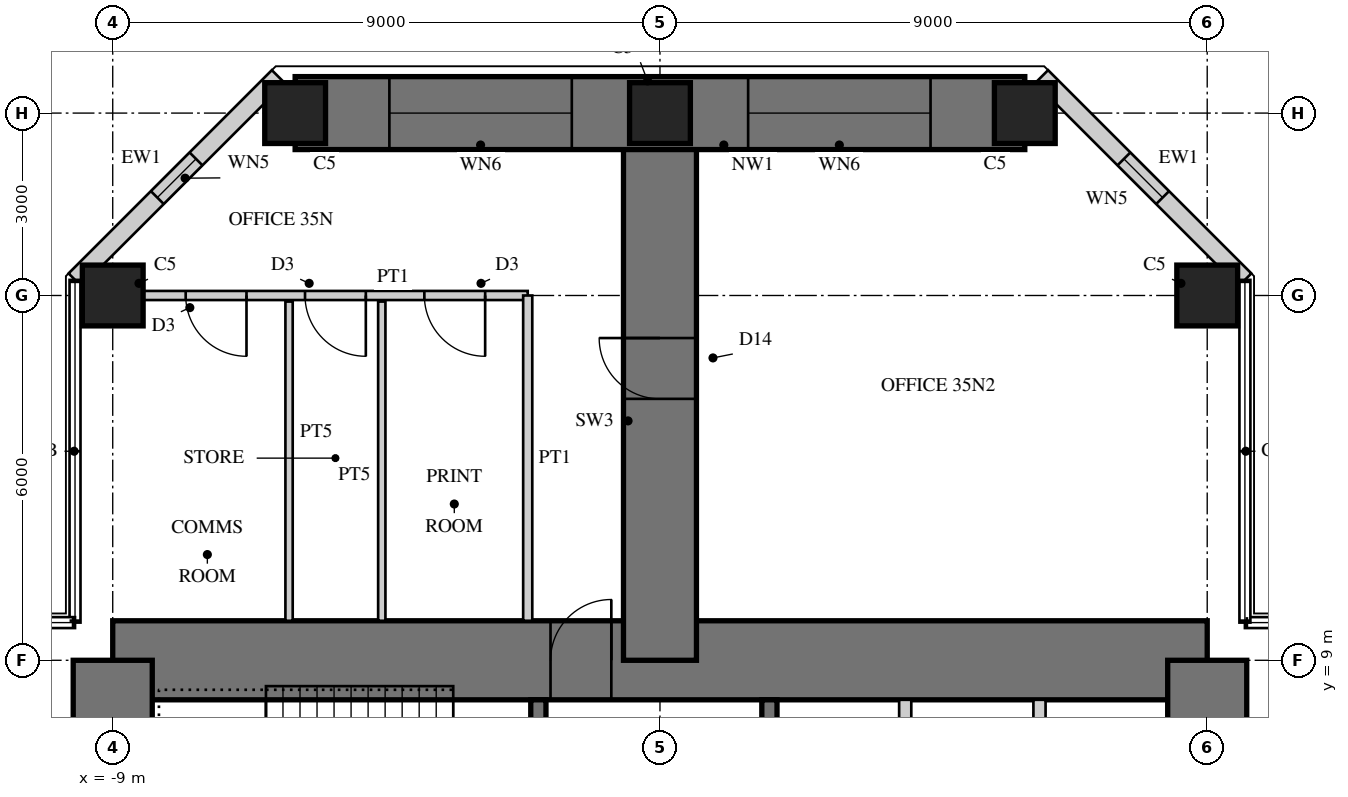
"""IFC4 building model, lengths in metres.
Left out: names, types, materials, properties, quantities, classifications, styles, units other than length and angle.
Written with IfcOpenShell. Run it as: python <this file> out.ifc"""

import sys

from ifc_helpers import new_model, si_unit, direction, frame, frame_2d, origin, origin_2d, place, context, subcontext, project, spatial, rectangle, hollow_rectangle, extrude, element, fill, save


model = new_model("IFC4")
c1 = context("Model", 3, precision=1e-05, world=origin(), true_north=direction((0.0, 1.0)))
c2 = subcontext(c1, "Body", "Model", "MODEL_VIEW")
j1 = project(units=[si_unit("LENGTHUNIT", "METRE"), si_unit("PLANEANGLEUNIT", "RADIAN")], contexts=[c1])
p1 = place(None, origin())
s1 = spatial("IfcSite", under=j1, at=p1, CompositionType="ELEMENT")
p2 = place(p1, origin())
s2 = spatial("IfcBuilding", under=s1, at=p2, CompositionType="ELEMENT")
p3 = place(p2, frame((0.0, 0.0, 144.5)))
s3 = spatial("IfcBuildingStorey", under=s2, at=p3, CompositionType="ELEMENT", Elevation=144.5)
p4 = place(p3, frame((9.0, 9.0, 0.0), z_axis=(0.0, 0.0, 1.0), x_axis=(-1.0, 0.0, 0.0)))
e1 = element("IfcWall", 1, at=p4, inside=s3, PredefinedType="SHEAR", context=c2, shape_type="SweptSolid", body=[
    extrude(rectangle(XDim=18.0, YDim=1.3, at=frame_2d((9.0, 0.0))), origin(), (0.0, 0.0, 1.0), 4.0),
])
p5 = place(p4, frame((9.8, 0.0, 0.0)))
e2 = element("IfcOpeningElement", 2, at=p5, cuts=e1, PredefinedType="OPENING", context=c2, shape_type="SweptSolid", body=[
    extrude(rectangle(XDim=1.0, YDim=2.4, at=frame_2d((0.5, 1.2))), frame((0.0, 0.66, 0.0), z_axis=(0.0, -1.0, 0.0), x_axis=(1.0, 0.0, 0.0)), (0.0, 0.0, 1.0), 1.32),
])
p6 = place(p3, frame((9.0, -9.0, 0.0), z_axis=(0.0, 0.0, 1.0), x_axis=(0.0, 1.0, 0.0)))
e3 = element("IfcWall", 3, at=p6, inside=s3, PredefinedType="SHEAR", context=c2, shape_type="SweptSolid", body=[
    extrude(rectangle(XDim=18.0, YDim=1.3, at=frame_2d((9.0, 0.0))), origin(), (0.0, 0.0, 1.0), 4.0),
])
p7 = place(p6, frame((9.8, 0.0, 0.0)))
e4 = element("IfcOpeningElement", 4, at=p7, cuts=e3, PredefinedType="OPENING", context=c2, shape_type="SweptSolid", body=[
    extrude(rectangle(XDim=1.0, YDim=2.4, at=frame_2d((0.5, 1.2))), frame((0.0, 0.66, 0.0), z_axis=(0.0, -1.0, 0.0), x_axis=(1.0, 0.0, 0.0)), (0.0, 0.0, 1.0), 1.32),
])
p8 = place(p3, frame((-9.0, 9.0, 0.0), z_axis=(0.0, 0.0, 1.0), x_axis=(0.0, -1.0, 0.0)))
e5 = element("IfcWall", 5, at=p8, inside=s3, PredefinedType="SHEAR", context=c2, shape_type="SweptSolid", body=[
    extrude(rectangle(XDim=18.0, YDim=1.3, at=frame_2d((9.0, 0.0))), origin(), (0.0, 0.0, 1.0), 4.0),
])
p9 = place(p8, frame((9.8, 0.0, 0.0)))
e6 = element("IfcOpeningElement", 6, at=p9, cuts=e5, PredefinedType="OPENING", context=c2, shape_type="SweptSolid", body=[
    extrude(rectangle(XDim=1.0, YDim=2.4, at=frame_2d((0.5, 1.2))), frame((0.0, 0.66, 0.0), z_axis=(0.0, -1.0, 0.0), x_axis=(1.0, 0.0, 0.0)), (0.0, 0.0, 1.0), 1.32),
])
p10 = place(p3, frame((1.8, 1.875, 0.0), z_axis=(0.0, 0.0, 1.0), x_axis=(0.0, 1.0, 0.0)))
e7 = element("IfcWall", 7, at=p10, inside=s3, PredefinedType="SHEAR", context=c2, shape_type="SweptSolid", body=[
    extrude(rectangle(XDim=6.475, YDim=0.25, at=frame_2d((3.238, 0.0))), origin(), (0.0, 0.0, 1.0), 4.0),
])
p11 = place(p10, frame((1.875, 0.0, 0.0)))
e8 = element("IfcOpeningElement", 8, at=p11, cuts=e7, PredefinedType="OPENING", context=c2, shape_type="SweptSolid", body=[
    extrude(rectangle(XDim=1.6, YDim=2.4, at=frame_2d((0.8, 1.2))), frame((0.0, 0.135, 0.0), z_axis=(0.0, -1.0, 0.0), x_axis=(1.0, 0.0, 0.0)), (0.0, 0.0, 1.0), 0.27),
])
for number, where, z_axis, x_axis in (
    (9, (4.033, 5.975, 0.0), (0.0, 0.0, 1.0), (0.0, 1.0, 0.0)),
    (10, (6.242, 5.975, 0.0), (0.0, 0.0, 1.0), (0.0, 1.0, 0.0)),
):
    element("IfcWall", number, at=place(p3, frame(where, z_axis=z_axis, x_axis=x_axis)), inside=s3, PredefinedType="PARTITIONING", context=c2, shape_type="SweptSolid", body=[
        extrude(rectangle(XDim=2.375, YDim=0.2, at=frame_2d((1.188, 0.0))), origin(), (0.0, 0.0, 1.0), 4.0),
    ])
p12 = place(p3, frame((-2.0, 1.675, 0.0), z_axis=(0.0, 0.0, 1.0), x_axis=(0.0, 1.0, 0.0)))
e11 = element("IfcWall", 11, at=p12, inside=s3, PredefinedType="SHEAR", context=c2, shape_type="SweptSolid", body=[
    extrude(rectangle(XDim=6.675, YDim=0.25, at=frame_2d((3.337, 0.0))), origin(), (0.0, 0.0, 1.0), 4.0),
])
p13 = place(p12, frame((0.725, 0.0, 0.0)))
e12 = element("IfcOpeningElement", 12, at=p13, cuts=e11, PredefinedType="OPENING", context=c2, shape_type="SweptSolid", body=[
    extrude(rectangle(XDim=1.0, YDim=2.1, at=frame_2d((0.5, 1.05))), frame((0.0, 0.135, 0.0), z_axis=(0.0, -1.0, 0.0), x_axis=(1.0, 0.0, 0.0)), (0.0, 0.0, 1.0), 0.27),
])
p14 = place(p3, frame((0.0, 9.0, 0.0), z_axis=(0.0, 0.0, 1.0), x_axis=(0.0, 1.0, 0.0)))
e13 = element("IfcWall", 13, at=p14, inside=s3, PredefinedType="SHEAR", context=c2, shape_type="SweptSolid", body=[
    extrude(rectangle(XDim=9.0, YDim=1.2, at=frame_2d((4.5, 0.0))), origin(), (0.0, 0.0, 1.0), 4.0),
])
p15 = place(p14, frame((4.3, 0.0, 0.0)))
e14 = element("IfcOpeningElement", 14, at=p15, cuts=e13, PredefinedType="OPENING", context=c2, shape_type="SweptSolid", body=[
    extrude(rectangle(XDim=1.0, YDim=2.2, at=frame_2d((0.5, 1.1))), frame((0.0, 0.61, 0.0), z_axis=(0.0, -1.0, 0.0), x_axis=(1.0, 0.0, 0.0)), (0.0, 0.0, 1.0), 1.22),
])
p16 = place(p3, frame((6.0, 18.0, 0.0), z_axis=(0.0, 0.0, 1.0), x_axis=(-1.0, 0.0, 0.0)))
e15 = element("IfcWall", 15, at=p16, inside=s3, PredefinedType="SHEAR", context=c2, shape_type="SweptSolid", body=[
    extrude(rectangle(XDim=12.0, YDim=1.2, at=frame_2d((6.0, 0.0))), origin(), (0.0, 0.0, 1.0), 4.0),
])
p17 = place(p16, frame((1.55, 0.0, 0.6)))
e16 = element("IfcOpeningElement", 16, at=p17, cuts=e15, PredefinedType="OPENING", context=c2, shape_type="SweptSolid", body=[
    extrude(rectangle(XDim=3.0, YDim=2.4, at=frame_2d((1.5, 1.2))), frame((0.0, 0.61, 0.0), z_axis=(0.0, -1.0, 0.0), x_axis=(1.0, 0.0, 0.0)), (0.0, 0.0, 1.0), 1.22),
])
p18 = place(p16, frame((7.45, 0.0, 0.6)))
e17 = element("IfcOpeningElement", 17, at=p18, cuts=e15, PredefinedType="OPENING", context=c2, shape_type="SweptSolid", body=[
    extrude(rectangle(XDim=3.0, YDim=2.4, at=frame_2d((1.5, 1.2))), frame((0.0, 0.61, 0.0), z_axis=(0.0, -1.0, 0.0), x_axis=(1.0, 0.0, 0.0)), (0.0, 0.0, 1.0), 1.22),
])
for number, where, z_axis, x_axis in (
    (18, (9.0, 15.0, 0.0), (0.0, 0.0, 1.0), (1.0, 0.0, 0.0)),
    (19, (-9.0, 15.0, 0.0), (0.0, 0.0, 1.0), (1.0, 0.0, 0.0)),
    (20, (6.0, 18.0, 0.0), (0.0, 0.0, 1.0), (1.0, 0.0, 0.0)),
    (21, (0.0, 18.0, 0.0), (0.0, 0.0, 1.0), (1.0, 0.0, 0.0)),
    (22, (-6.0, 18.0, 0.0), (0.0, 0.0, 1.0), (1.0, 0.0, 0.0)),
):
    element("IfcColumn", number, at=place(p3, frame(where, z_axis=z_axis, x_axis=x_axis)), inside=s3, PredefinedType="COLUMN", context=c2, shape_type="SweptSolid", body=[
        extrude(rectangle(XDim=1.0, YDim=1.0, at=origin_2d()), origin(), (0.0, 0.0, 1.0), 4.0),
    ])
p19 = place(p3, frame((9.62, 15.257, 0.0), z_axis=(0.0, 0.0, 1.0), x_axis=(-0.707106781187, 0.707106781187, 0.0)))
e23 = element("IfcWall", 23, at=p19, inside=s3, PredefinedType="SOLIDWALL", context=c2, shape_type="SweptSolid", body=[
    extrude(rectangle(XDim=4.728, YDim=0.3, at=frame_2d((2.364, 0.0))), origin(), (0.0, 0.0, 1.0), 3.8),
])
p20 = place(p19, frame((1.914, 0.0, 0.3)))
e24 = element("IfcOpeningElement", 24, at=p20, cuts=e23, PredefinedType="OPENING", context=c2, shape_type="SweptSolid", body=[
    extrude(rectangle(XDim=0.9, YDim=2.4, at=frame_2d((0.45, 1.2))), frame((0.0, 0.16, 0.0), z_axis=(0.0, -1.0, 0.0), x_axis=(1.0, 0.0, 0.0)), (0.0, 0.0, 1.0), 0.32),
])
p21 = place(p3, frame((-6.277, 18.6, 0.0), z_axis=(0.0, 0.0, 1.0), x_axis=(-0.707106781187, -0.707106781187, 0.0)))
e25 = element("IfcWall", 25, at=p21, inside=s3, PredefinedType="SOLIDWALL", context=c2, shape_type="SweptSolid", body=[
    extrude(rectangle(XDim=4.728, YDim=0.3, at=frame_2d((2.364, 0.0))), origin(), (0.0, 0.0, 1.0), 3.8),
])
p22 = place(p21, frame((1.914, 0.0, 0.3)))
e26 = element("IfcOpeningElement", 26, at=p22, cuts=e25, PredefinedType="OPENING", context=c2, shape_type="SweptSolid", body=[
    extrude(rectangle(XDim=0.9, YDim=2.4, at=frame_2d((0.45, 1.2))), frame((0.0, 0.16, 0.0), z_axis=(0.0, -1.0, 0.0), x_axis=(1.0, 0.0, 0.0)), (0.0, 0.0, 1.0), 0.32),
])
p23 = place(p3, frame((-2.175, 15.0, 0.0), z_axis=(0.0, 0.0, 1.0), x_axis=(-1.0, 0.0, 0.0)))
e27 = element("IfcWall", 27, at=p23, inside=s3, PredefinedType="PARTITIONING", context=c2, shape_type="SweptSolid", body=[
    extrude(rectangle(XDim=6.325, YDim=0.15, at=frame_2d((3.163, 0.0))), origin(), (0.0, 0.0, 1.0), 3.0),
])
p24 = place(p23, frame((0.7, 0.0, 0.0)))
e28 = element("IfcOpeningElement", 28, at=p24, cuts=e27, PredefinedType="OPENING", context=c2, shape_type="SweptSolid", body=[
    extrude(rectangle(XDim=1.0, YDim=2.1, at=frame_2d((0.5, 1.05))), frame((0.0, 0.085, 0.0), z_axis=(0.0, -1.0, 0.0), x_axis=(1.0, 0.0, 0.0)), (0.0, 0.0, 1.0), 0.17),
])
p25 = place(p23, frame((2.663, 0.0, 0.0)))
e29 = element("IfcOpeningElement", 29, at=p25, cuts=e27, PredefinedType="OPENING", context=c2, shape_type="SweptSolid", body=[
    extrude(rectangle(XDim=1.0, YDim=2.1, at=frame_2d((0.5, 1.05))), frame((0.0, 0.085, 0.0), z_axis=(0.0, -1.0, 0.0), x_axis=(1.0, 0.0, 0.0)), (0.0, 0.0, 1.0), 0.17),
])
p26 = place(p23, frame((4.625, 0.0, 0.0)))
e30 = element("IfcOpeningElement", 30, at=p26, cuts=e27, PredefinedType="OPENING", context=c2, shape_type="SweptSolid", body=[
    extrude(rectangle(XDim=1.0, YDim=2.1, at=frame_2d((0.5, 1.05))), frame((0.0, 0.085, 0.0), z_axis=(0.0, -1.0, 0.0), x_axis=(1.0, 0.0, 0.0)), (0.0, 0.0, 1.0), 0.17),
])
p27 = place(p3, frame((-2.175, 9.65, 0.0), z_axis=(0.0, 0.0, 1.0), x_axis=(0.0, 1.0, 0.0)))
e31 = element("IfcWall", 31, at=p27, inside=s3, PredefinedType="PARTITIONING", context=c2, shape_type="SweptSolid", body=[
    extrude(rectangle(XDim=5.35, YDim=0.15, at=frame_2d((2.675, 0.0))), origin(), (0.0, 0.0, 1.0), 3.8),
])
p28 = place(p3, frame((-4.575, 9.65, 0.0), z_axis=(0.0, 0.0, 1.0), x_axis=(0.0, 1.0, 0.0)))
e32 = element("IfcWall", 32, at=p28, inside=s3, PredefinedType="PLUMBINGWALL", context=c2, shape_type="SweptSolid", body=[
    extrude(rectangle(XDim=5.25, YDim=0.12, at=frame_2d((2.625, 0.0))), origin(), (0.0, 0.0, 1.0), 3.8),
])
p29 = place(p3, frame((-6.1, 9.65, 0.0), z_axis=(0.0, 0.0, 1.0), x_axis=(0.0, 1.0, 0.0)))
e33 = element("IfcWall", 33, at=p29, inside=s3, PredefinedType="PLUMBINGWALL", context=c2, shape_type="SweptSolid", body=[
    extrude(rectangle(XDim=5.25, YDim=0.12, at=frame_2d((2.625, 0.0))), origin(), (0.0, 0.0, 1.0), 3.1),
])
p30 = place(p20, origin())
e34 = element("IfcWindow", 34, at=p30, inside=s3, PartitioningType="SINGLE_PANEL", PredefinedType="WINDOW", context=c2, shape_type="SweptSolid", body=[
    extrude(hollow_rectangle(XDim=0.9, YDim=2.4, WallThickness=0.06, at=frame_2d((0.45, 1.2))), frame((0.0, 0.03, 0.0), z_axis=(0.0, -1.0, 0.0), x_axis=(1.0, 0.0, 0.0)), (0.0, 0.0, 1.0), 0.06),
    extrude(rectangle(XDim=0.779, YDim=2.279, at=frame_2d((0.45, 1.2))), frame((0.0, 0.03, 0.0), z_axis=(0.0, -1.0, 0.0), x_axis=(1.0, 0.0, 0.0)), (0.0, 0.0, 1.0), 0.06),
])
fill(e24, e34)
p31 = place(p17, origin())
e35 = element("IfcWindow", 35, at=p31, inside=s3, PartitioningType="SINGLE_PANEL", PredefinedType="WINDOW", context=c2, shape_type="SweptSolid", body=[
    extrude(hollow_rectangle(XDim=3.0, YDim=2.4, WallThickness=0.06, at=frame_2d((1.5, 1.2))), frame((0.0, 0.03, 0.0), z_axis=(0.0, -1.0, 0.0), x_axis=(1.0, 0.0, 0.0)), (0.0, 0.0, 1.0), 0.06),
    extrude(rectangle(XDim=2.879, YDim=2.279, at=frame_2d((1.5, 1.2))), frame((0.0, 0.03, 0.0), z_axis=(0.0, -1.0, 0.0), x_axis=(1.0, 0.0, 0.0)), (0.0, 0.0, 1.0), 0.06),
])
fill(e16, e35)
p32 = place(p18, origin())
e36 = element("IfcWindow", 36, at=p32, inside=s3, PartitioningType="SINGLE_PANEL", PredefinedType="WINDOW", context=c2, shape_type="SweptSolid", body=[
    extrude(hollow_rectangle(XDim=3.0, YDim=2.4, WallThickness=0.06, at=frame_2d((1.5, 1.2))), frame((0.0, 0.03, 0.0), z_axis=(0.0, -1.0, 0.0), x_axis=(1.0, 0.0, 0.0)), (0.0, 0.0, 1.0), 0.06),
    extrude(rectangle(XDim=2.879, YDim=2.279, at=frame_2d((1.5, 1.2))), frame((0.0, 0.03, 0.0), z_axis=(0.0, -1.0, 0.0), x_axis=(1.0, 0.0, 0.0)), (0.0, 0.0, 1.0), 0.06),
])
fill(e17, e36)
p33 = place(p22, origin())
e37 = element("IfcWindow", 37, at=p33, inside=s3, PartitioningType="SINGLE_PANEL", PredefinedType="WINDOW", context=c2, shape_type="SweptSolid", body=[
    extrude(hollow_rectangle(XDim=0.9, YDim=2.4, WallThickness=0.06, at=frame_2d((0.45, 1.2))), frame((0.0, 0.03, 0.0), z_axis=(0.0, -1.0, 0.0), x_axis=(1.0, 0.0, 0.0)), (0.0, 0.0, 1.0), 0.06),
    extrude(rectangle(XDim=0.779, YDim=2.279, at=frame_2d((0.45, 1.2))), frame((0.0, 0.03, 0.0), z_axis=(0.0, -1.0, 0.0), x_axis=(1.0, 0.0, 0.0)), (0.0, 0.0, 1.0), 0.06),
])
fill(e26, e37)
p34 = place(p24, origin())
e38 = element("IfcDoor", 38, at=p34, inside=s3, OperationType="SINGLE_SWING_LEFT", PredefinedType="DOOR", context=c2, shape_type="SweptSolid", body=[
    extrude(rectangle(XDim=1.0, YDim=2.1, at=frame_2d((0.5, 1.05))), frame((0.0, 0.025, 0.0), z_axis=(0.0, -1.0, 0.0), x_axis=(1.0, 0.0, 0.0)), (0.0, 0.0, 1.0), 0.05),
])
fill(e28, e38)
p35 = place(p25, origin())
e39 = element("IfcDoor", 39, at=p35, inside=s3, OperationType="SINGLE_SWING_LEFT", PredefinedType="DOOR", context=c2, shape_type="SweptSolid", body=[
    extrude(rectangle(XDim=1.0, YDim=2.1, at=frame_2d((0.5, 1.05))), frame((0.0, 0.025, 0.0), z_axis=(0.0, -1.0, 0.0), x_axis=(1.0, 0.0, 0.0)), (0.0, 0.0, 1.0), 0.05),
])
fill(e29, e39)
p36 = place(p26, origin())
e40 = element("IfcDoor", 40, at=p36, inside=s3, OperationType="SINGLE_SWING_LEFT", PredefinedType="DOOR", context=c2, shape_type="SweptSolid", body=[
    extrude(rectangle(XDim=1.0, YDim=2.1, at=frame_2d((0.5, 1.05))), frame((0.0, 0.025, 0.0), z_axis=(0.0, -1.0, 0.0), x_axis=(1.0, 0.0, 0.0)), (0.0, 0.0, 1.0), 0.05),
])
fill(e30, e40)
p37 = place(p15, origin())
e41 = element("IfcDoor", 41, at=p37, inside=s3, OperationType="SINGLE_SWING_RIGHT", PredefinedType="DOOR", context=c2, shape_type="SweptSolid", body=[
    extrude(rectangle(XDim=1.0, YDim=2.2, at=frame_2d((0.5, 1.1))), frame((0.0, 0.025, 0.0), z_axis=(0.0, -1.0, 0.0), x_axis=(1.0, 0.0, 0.0)), (0.0, 0.0, 1.0), 0.05),
])
fill(e14, e41)
p38 = place(p5, frame((1.0, 0.0, 0.0), z_axis=(0.0, 0.0, 1.0), x_axis=(-1.0, 0.0, 0.0)))
e42 = element("IfcDoor", 42, at=p38, inside=s3, OperationType="SINGLE_SWING_RIGHT", PredefinedType="DOOR", context=c2, shape_type="SweptSolid", body=[
    extrude(rectangle(XDim=1.0, YDim=2.4, at=frame_2d((0.5, 1.2))), frame((0.0, -0.005, 0.0), z_axis=(0.0, -1.0, 0.0), x_axis=(1.0, 0.0, 0.0)), (0.0, 0.0, 1.0), 0.05),
])
fill(e2, e42)
save(model, sys.argv[1])
